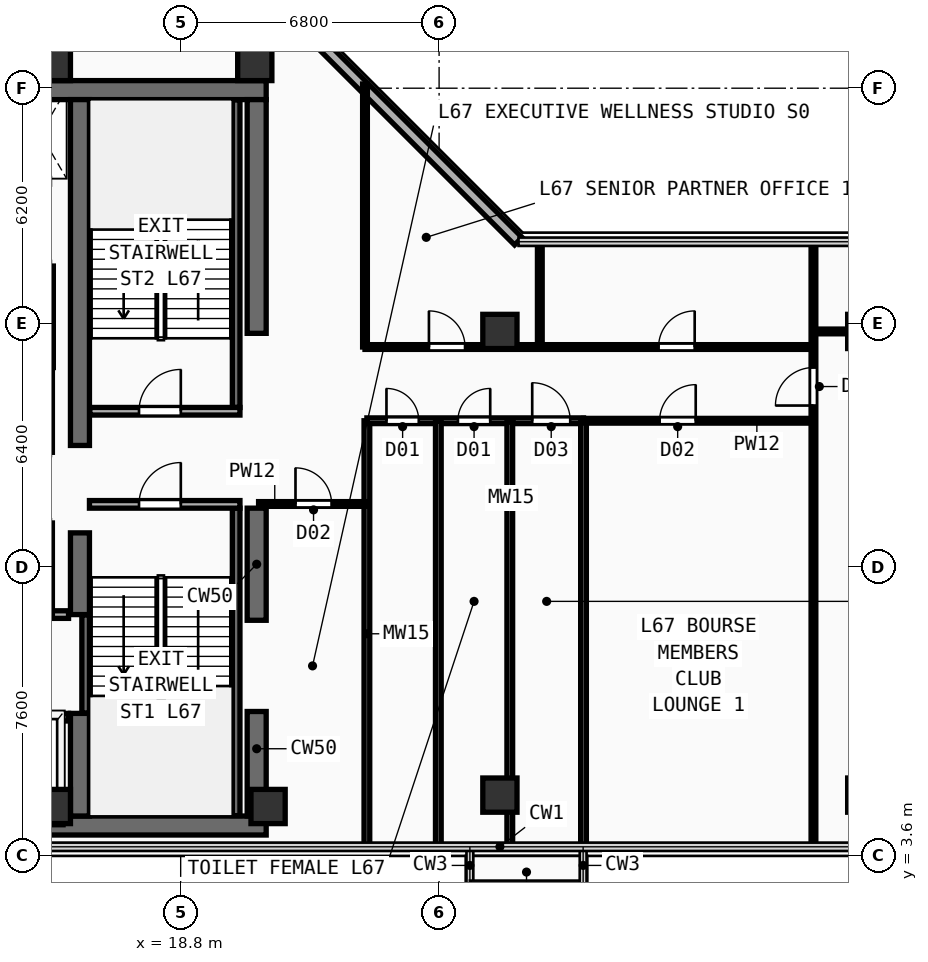
"""IFC4 building model, lengths in metres.
Left out: names, types, materials, properties, quantities, classifications, styles, units other than length and angle.
Written with IfcOpenShell. Run it as: python <this file> out.ifc"""

import sys

from ifc_helpers import new_model, si_unit, direction, frame, frame_2d, origin, origin_2d, place, context, subcontext, project, spatial, rectangle, extrude, element, fill, save


model = new_model("IFC4")
c1 = context("Model", 3, precision=1e-05, world=origin(), true_north=direction((0.0, 1.0)))
c2 = subcontext(c1, "Body", "Model", "MODEL_VIEW")
j1 = project(units=[si_unit("LENGTHUNIT", "METRE"), si_unit("PLANEANGLEUNIT", "RADIAN")], contexts=[c1])
p1 = place(None, origin())
s1 = spatial("IfcSite", under=j1, at=p1, CompositionType="ELEMENT")
p2 = place(p1, origin())
s2 = spatial("IfcBuilding", under=s1, at=p2, CompositionType="ELEMENT")
p3 = place(p2, frame((0.0, 0.0, 262.8)))
s3 = spatial("IfcBuildingStorey", under=s2, at=p3, CompositionType="ELEMENT", Elevation=262.8)
for number, where, z_axis, x_axis in (
    (1, (7.2, 4.4, 0.0), (0.0, 0.0, 1.0), (1.0, 0.0, 0.0)),
    (2, (7.2, 23.75, 0.0), (0.0, 0.0, 1.0), (1.0, 0.0, 0.0)),
):
    element("IfcWall", number, at=place(p3, frame(where, z_axis=z_axis, x_axis=x_axis)), inside=s3, PredefinedType="SHEAR", context=c2, shape_type="SweptSolid", body=[
        extrude(rectangle(XDim=13.85, YDim=0.5, at=frame_2d((6.925, 0.0))), origin(), (0.0, 0.0, 1.0), 3.56),
    ])
p4 = place(p3, frame((20.8, 4.65, 0.0), z_axis=(0.0, 0.0, 1.0), x_axis=(0.0, 1.0, 0.0)))
e3 = element("IfcWall", 3, at=p4, inside=s3, PredefinedType="SHEAR", context=c2, shape_type="SweptSolid", body=[
    extrude(rectangle(XDim=2.75, YDim=0.5, at=frame_2d((1.375, 0.0))), origin(), (0.0, 0.0, 1.0), 3.56),
])
p5 = place(p3, frame((20.8, 9.8, 0.0), z_axis=(0.0, 0.0, 1.0), x_axis=(0.0, 1.0, 0.0)))
e4 = element("IfcWall", 4, at=p5, inside=s3, PredefinedType="SHEAR", context=c2, shape_type="SweptSolid", body=[
    extrude(rectangle(XDim=2.95, YDim=0.5, at=frame_2d((1.475, 0.0))), origin(), (0.0, 0.0, 1.0), 3.56),
])
p6 = place(p3, frame((20.8, 17.35, 0.0), z_axis=(0.0, 0.0, 1.0), x_axis=(0.0, 1.0, 0.0)))
e5 = element("IfcWall", 5, at=p6, inside=s3, PredefinedType="SHEAR", context=c2, shape_type="SweptSolid", body=[
    extrude(rectangle(XDim=6.15, YDim=0.5, at=frame_2d((3.075, 0.0))), origin(), (0.0, 0.0, 1.0), 3.56),
])
p7 = place(p3, frame((16.15, 4.65, 0.0), z_axis=(0.0, 0.0, 1.0), x_axis=(0.0, 1.0, 0.0)))
e6 = element("IfcWall", 6, at=p7, inside=s3, PredefinedType="SHEAR", context=c2, shape_type="SweptSolid", body=[
    extrude(rectangle(XDim=2.7, YDim=0.5, at=frame_2d((1.35, 0.0))), origin(), (0.0, 0.0, 1.0), 3.56),
])
p8 = place(p3, frame((16.15, 9.95, 0.0), z_axis=(0.0, 0.0, 1.0), x_axis=(0.0, 1.0, 0.0)))
e7 = element("IfcWall", 7, at=p8, inside=s3, PredefinedType="SHEAR", context=c2, shape_type="SweptSolid", body=[
    extrude(rectangle(XDim=2.15, YDim=0.5, at=frame_2d((1.075, 0.0))), origin(), (0.0, 0.0, 1.0), 3.56),
])
p9 = place(p3, frame((16.15, 14.4, 0.0), z_axis=(0.0, 0.0, 1.0), x_axis=(0.0, 1.0, 0.0)))
e8 = element("IfcWall", 8, at=p9, inside=s3, PredefinedType="SHEAR", context=c2, shape_type="SweptSolid", body=[
    extrude(rectangle(XDim=9.1, YDim=0.5, at=frame_2d((4.55, 0.0))), origin(), (0.0, 0.0, 1.0), 3.56),
])
for number, where, z_axis, x_axis in (
    (9, (15.45, 4.9, 0.0), (0.0, 0.0, 1.0), (1.0, 0.0, 0.0)),
    (10, (21.1, 4.9, 0.0), (0.0, 0.0, 1.0), (1.0, 0.0, 0.0)),
    (11, (15.45, 24.45, 0.0), (0.0, 0.0, 1.0), (1.0, 0.0, 0.0)),
    (12, (20.75, 24.45, 0.0), (0.0, 0.0, 1.0), (1.0, 0.0, 0.0)),
    (13, (27.2, 5.2, 0.0), (0.0, 0.0, 1.0), (1.0, 0.0, 0.0)),
    (14, (36.8, 5.2, 0.0), (0.0, 0.0, 1.0), (1.0, 0.0, 0.0)),
    (15, (27.2, 17.4, 0.0), (0.0, 0.0, 1.0), (1.0, 0.0, 0.0)),
    (16, (36.8, 17.4, 0.0), (0.0, 0.0, 1.0), (1.0, 0.0, 0.0)),
):
    element("IfcColumn", number, at=place(p3, frame(where, z_axis=z_axis, x_axis=x_axis)), inside=s3, PredefinedType="COLUMN", context=c2, shape_type="SweptSolid", body=[
        extrude(rectangle(XDim=0.9, YDim=0.9, at=origin_2d()), origin(), (0.0, 0.0, 1.0), 3.56),
    ])
p10 = place(p3, frame((27.685, 19.775, 0.0), z_axis=(0.0, 0.0, 1.0), x_axis=(-0.707106781187, 0.707106781187, 0.0)))
e17 = element("IfcWall", 17, at=p10, inside=s3, PredefinedType="SOLIDWALL", context=c2, shape_type="SweptSolid", body=[
    extrude(rectangle(XDim=9.207, YDim=0.28, at=frame_2d((4.603, 0.0))), origin(), (0.0, 0.0, 1.0), 3.56),
])
p11 = place(p3, frame((16.3, 7.36, 0.0), z_axis=(0.0, 0.0, 1.0), x_axis=(0.0, 1.0, 0.0)))
e18 = element("IfcWall", 18, at=p11, inside=s3, PredefinedType="SHEAR", context=c2, shape_type="SweptSolid", body=[
    extrude(rectangle(XDim=2.58, YDim=0.2, at=frame_2d((1.29, 0.0))), origin(), (0.0, 0.0, 1.0), 3.56),
])
p12 = place(p3, frame((20.26, 4.66, 0.0), z_axis=(0.0, 0.0, 1.0), x_axis=(0.0, 1.0, 0.0)))
e19 = element("IfcWall", 19, at=p12, inside=s3, PredefinedType="SHEAR", context=c2, shape_type="SweptSolid", body=[
    extrude(rectangle(XDim=8.09, YDim=0.2, at=frame_2d((4.045, 0.0))), origin(), (0.0, 0.0, 1.0), 3.56),
])
p13 = place(p3, frame((16.4, 12.85, 0.0), z_axis=(0.0, 0.0, 1.0), x_axis=(1.0, 0.0, 0.0)))
e20 = element("IfcWall", 20, at=p13, inside=s3, PredefinedType="PARTITIONING", context=c2, shape_type="SweptSolid", body=[
    extrude(rectangle(XDim=3.96, YDim=0.2, at=frame_2d((1.98, 0.0))), origin(), (0.0, 0.0, 1.0), 3.56),
])
p14 = place(p13, frame((1.304, 0.0, 0.0)))
e21 = element("IfcOpeningElement", 21, at=p14, cuts=e20, PredefinedType="OPENING", context=c2, shape_type="SweptSolid", body=[
    extrude(rectangle(XDim=1.1, YDim=2.2, at=frame_2d((0.55, 1.1))), frame((0.0, 0.11, 0.0), z_axis=(0.0, -1.0, 0.0), x_axis=(1.0, 0.0, 0.0)), (0.0, 0.0, 1.0), 0.22),
])
p15 = place(p3, frame((20.26, 15.4, 0.0), z_axis=(0.0, 0.0, 1.0), x_axis=(0.0, 1.0, 0.0)))
e22 = element("IfcWall", 22, at=p15, inside=s3, PredefinedType="SHEAR", context=c2, shape_type="SweptSolid", body=[
    extrude(rectangle(XDim=8.09, YDim=0.2, at=frame_2d((4.045, 0.0))), origin(), (0.0, 0.0, 1.0), 3.56),
])
p16 = place(p3, frame((16.41, 15.3, 0.0), z_axis=(0.0, 0.0, 1.0), x_axis=(1.0, 0.0, 0.0)))
e23 = element("IfcWall", 23, at=p16, inside=s3, PredefinedType="PARTITIONING", context=c2, shape_type="SweptSolid", body=[
    extrude(rectangle(XDim=3.95, YDim=0.2, at=frame_2d((1.975, 0.0))), origin(), (0.0, 0.0, 1.0), 3.56),
])
p17 = place(p16, frame((1.294, 0.0, 0.0)))
e24 = element("IfcOpeningElement", 24, at=p17, cuts=e23, PredefinedType="OPENING", context=c2, shape_type="SweptSolid", body=[
    extrude(rectangle(XDim=1.1, YDim=2.2, at=frame_2d((0.55, 1.1))), frame((0.0, 0.11, 0.0), z_axis=(0.0, -1.0, 0.0), x_axis=(1.0, 0.0, 0.0)), (0.0, 0.0, 1.0), 0.22),
])
p18 = place(p3, frame((7.5, 7.25, 0.0), z_axis=(0.0, 0.0, 1.0), x_axis=(1.0, 0.0, 0.0)))
e25 = element("IfcWall", 25, at=p18, inside=s3, PredefinedType="PARTITIONING", context=c2, shape_type="SweptSolid", body=[
    extrude(rectangle(XDim=8.35, YDim=0.2, at=frame_2d((4.175, 0.0))), origin(), (0.0, 0.0, 1.0), 3.56),
])
p19 = place(p18, frame((0.53, 0.0, 0.0)))
e26 = element("IfcOpeningElement", 26, at=p19, cuts=e25, PredefinedType="OPENING", context=c2, shape_type="SweptSolid", body=[
    extrude(rectangle(XDim=1.1, YDim=2.2, at=frame_2d((0.55, 1.1))), frame((0.0, 0.11, 0.0), z_axis=(0.0, -1.0, 0.0), x_axis=(1.0, 0.0, 0.0)), (0.0, 0.0, 1.0), 0.22),
])
p20 = place(p18, frame((2.37, 0.0, 0.0)))
e27 = element("IfcOpeningElement", 27, at=p20, cuts=e25, PredefinedType="OPENING", context=c2, shape_type="SweptSolid", body=[
    extrude(rectangle(XDim=1.1, YDim=2.2, at=frame_2d((0.55, 1.1))), frame((0.0, 0.11, 0.0), z_axis=(0.0, -1.0, 0.0), x_axis=(1.0, 0.0, 0.0)), (0.0, 0.0, 1.0), 0.22),
])
p21 = place(p18, frame((4.33, 0.0, 0.0)))
e28 = element("IfcOpeningElement", 28, at=p21, cuts=e25, PredefinedType="OPENING", context=c2, shape_type="SweptSolid", body=[
    extrude(rectangle(XDim=1.1, YDim=2.2, at=frame_2d((0.55, 1.1))), frame((0.0, 0.11, 0.0), z_axis=(0.0, -1.0, 0.0), x_axis=(1.0, 0.0, 0.0)), (0.0, 0.0, 1.0), 0.22),
])
p22 = place(p18, frame((6.5, 0.0, 0.0)))
e29 = element("IfcOpeningElement", 29, at=p22, cuts=e25, PredefinedType="OPENING", context=c2, shape_type="SweptSolid", body=[
    extrude(rectangle(XDim=1.1, YDim=2.2, at=frame_2d((0.55, 1.1))), frame((0.0, 0.11, 0.0), z_axis=(0.0, -1.0, 0.0), x_axis=(1.0, 0.0, 0.0)), (0.0, 0.0, 1.0), 0.22),
])
p23 = place(p3, frame((7.5, 9.95, 0.0), z_axis=(0.0, 0.0, 1.0), x_axis=(1.0, 0.0, 0.0)))
e30 = element("IfcWall", 30, at=p23, inside=s3, PredefinedType="PARTITIONING", context=c2, shape_type="SweptSolid", body=[
    extrude(rectangle(XDim=8.35, YDim=0.2, at=frame_2d((4.175, 0.0))), origin(), (0.0, 0.0, 1.0), 3.56),
])
p24 = place(p3, frame((15.35, 9.95, 0.0), z_axis=(0.0, 0.0, 1.0), x_axis=(0.0, 1.0, 0.0)))
e31 = element("IfcWall", 31, at=p24, inside=s3, PredefinedType="PARTITIONING", context=c2, shape_type="SweptSolid", body=[
    extrude(rectangle(XDim=2.41, YDim=0.15, at=frame_2d((1.205, 0.0))), origin(), (0.0, 0.0, 1.0), 3.56),
])
p25 = place(p3, frame((15.35, 14.22, 0.0), z_axis=(0.0, 0.0, 1.0), x_axis=(0.0, 1.0, 0.0)))
e32 = element("IfcWall", 32, at=p25, inside=s3, PredefinedType="PARTITIONING", context=c2, shape_type="SweptSolid", body=[
    extrude(rectangle(XDim=2.23, YDim=0.15, at=frame_2d((1.115, 0.0))), origin(), (0.0, 0.0, 1.0), 3.56),
])
p26 = place(p3, frame((15.35, 16.45, 0.0), z_axis=(0.0, 0.0, 1.0), x_axis=(0.0, 1.0, 0.0)))
e33 = element("IfcWall", 33, at=p26, inside=s3, PredefinedType="PARTITIONING", context=c2, shape_type="SweptSolid", body=[
    extrude(rectangle(XDim=2.67, YDim=0.2, at=frame_2d((1.335, 0.0))), origin(), (0.0, 0.0, 1.0), 3.56),
])
p27 = place(p3, frame((23.7, 3.84, 0.0), z_axis=(0.0, 0.0, 1.0), x_axis=(0.0, 1.0, 0.0)))
e34 = element("IfcWall", 34, at=p27, inside=s3, PredefinedType="PLUMBINGWALL", context=c2, shape_type="SweptSolid", body=[
    extrude(rectangle(XDim=11.21, YDim=0.15, at=frame_2d((5.605, 0.0))), origin(), (0.0, 0.0, 1.0), 3.56),
])
p28 = place(p3, frame((23.7, 15.05, 0.0), z_axis=(0.0, 0.0, 1.0), x_axis=(1.0, 0.0, 0.0)))
e35 = element("IfcWall", 35, at=p28, inside=s3, PredefinedType="PLUMBINGWALL", context=c2, shape_type="SweptSolid", body=[
    extrude(rectangle(XDim=5.7, YDim=0.15, at=frame_2d((2.85, 0.0))), origin(), (0.0, 0.0, 1.0), 3.56),
])
p29 = place(p28, frame((0.515, 0.0, 0.0)))
e36 = element("IfcOpeningElement", 36, at=p29, cuts=e35, PredefinedType="OPENING", context=c2, shape_type="SweptSolid", body=[
    extrude(rectangle(XDim=0.85, YDim=2.15, at=frame_2d((0.425, 1.075))), frame((0.0, 0.085, 0.0), z_axis=(0.0, -1.0, 0.0), x_axis=(1.0, 0.0, 0.0)), (0.0, 0.0, 1.0), 0.17),
])
p30 = place(p28, frame((2.395, 0.0, 0.0)))
e37 = element("IfcOpeningElement", 37, at=p30, cuts=e35, PredefinedType="OPENING", context=c2, shape_type="SweptSolid", body=[
    extrude(rectangle(XDim=0.85, YDim=2.15, at=frame_2d((0.425, 1.075))), frame((0.0, 0.085, 0.0), z_axis=(0.0, -1.0, 0.0), x_axis=(1.0, 0.0, 0.0)), (0.0, 0.0, 1.0), 0.17),
])
p31 = place(p28, frame((4.35, 0.0, 0.0)))
e38 = element("IfcOpeningElement", 38, at=p31, cuts=e35, PredefinedType="OPENING", context=c2, shape_type="SweptSolid", body=[
    extrude(rectangle(XDim=1.0, YDim=2.2, at=frame_2d((0.5, 1.1))), frame((0.0, 0.085, 0.0), z_axis=(0.0, -1.0, 0.0), x_axis=(1.0, 0.0, 0.0)), (0.0, 0.0, 1.0), 0.17),
])
p32 = place(p3, frame((25.58, 3.84, 0.0), z_axis=(0.0, 0.0, 1.0), x_axis=(0.0, 1.0, 0.0)))
e39 = element("IfcWall", 39, at=p32, inside=s3, PredefinedType="PLUMBINGWALL", context=c2, shape_type="SweptSolid", body=[
    extrude(rectangle(XDim=11.21, YDim=0.15, at=frame_2d((5.605, 0.0))), origin(), (0.0, 0.0, 1.0), 3.56),
])
p33 = place(p3, frame((27.46, 3.84, 0.0), z_axis=(0.0, 0.0, 1.0), x_axis=(0.0, 1.0, 0.0)))
e40 = element("IfcWall", 40, at=p33, inside=s3, PredefinedType="PLUMBINGWALL", context=c2, shape_type="SweptSolid", body=[
    extrude(rectangle(XDim=11.21, YDim=0.15, at=frame_2d((5.605, 0.0))), origin(), (0.0, 0.0, 1.0), 2.798),
])
p34 = place(p3, frame((29.4, 3.84, 0.0), z_axis=(0.0, 0.0, 1.0), x_axis=(0.0, 1.0, 0.0)))
e41 = element("IfcWall", 41, at=p34, inside=s3, PredefinedType="PLUMBINGWALL", context=c2, shape_type="SweptSolid", body=[
    extrude(rectangle(XDim=11.21, YDim=0.15, at=frame_2d((5.605, 0.0))), origin(), (0.0, 0.0, 1.0), 3.56),
])
p35 = place(p3, frame((20.85, 12.86, 0.0), z_axis=(0.0, 0.0, 1.0), x_axis=(1.0, 0.0, 0.0)))
e42 = element("IfcWall", 42, at=p35, inside=s3, PredefinedType="PARTITIONING", context=c2, shape_type="SweptSolid", body=[
    extrude(rectangle(XDim=2.85, YDim=0.125, at=frame_2d((1.425, 0.0))), origin(), (0.0, 0.0, 1.0), 3.56),
])
p36 = place(p35, frame((0.971, 0.0, 0.0)))
e43 = element("IfcOpeningElement", 43, at=p36, cuts=e42, PredefinedType="OPENING", context=c2, shape_type="SweptSolid", body=[
    extrude(rectangle(XDim=0.95, YDim=2.15, at=frame_2d((0.475, 1.075))), frame((0.0, 0.073, 0.0), z_axis=(0.0, -1.0, 0.0), x_axis=(1.0, 0.0, 0.0)), (0.0, 0.0, 1.0), 0.145),
])
p37 = place(p3, frame((29.4, 15.05, 0.0), z_axis=(0.0, 0.0, 1.0), x_axis=(1.0, 0.0, 0.0)))
e44 = element("IfcWall", 44, at=p37, inside=s3, PredefinedType="PARTITIONING", context=c2, shape_type="SweptSolid", body=[
    extrude(rectangle(XDim=6.05, YDim=0.125, at=frame_2d((3.025, 0.0))), origin(), (0.0, 0.0, 1.0), 3.56),
])
p38 = place(p37, frame((2.002, 0.0, 0.0)))
e45 = element("IfcOpeningElement", 45, at=p38, cuts=e44, PredefinedType="OPENING", context=c2, shape_type="SweptSolid", body=[
    extrude(rectangle(XDim=0.95, YDim=2.15, at=frame_2d((0.475, 1.075))), frame((0.0, 0.073, 0.0), z_axis=(0.0, -1.0, 0.0), x_axis=(1.0, 0.0, 0.0)), (0.0, 0.0, 1.0), 0.145),
])
p39 = place(p3, frame((35.45, 3.84, 0.0), z_axis=(0.0, 0.0, 1.0), x_axis=(0.0, 1.0, 0.0)))
e46 = element("IfcWall", 46, at=p39, inside=s3, PredefinedType="PARTITIONING", context=c2, shape_type="SweptSolid", body=[
    extrude(rectangle(XDim=15.92, YDim=0.125, at=frame_2d((7.96, 0.0))), origin(), (0.0, 0.0, 1.0), 3.56),
])
p40 = place(p39, frame((11.61, 0.0, 0.0)))
e47 = element("IfcOpeningElement", 47, at=p40, cuts=e46, PredefinedType="OPENING", context=c2, shape_type="SweptSolid", body=[
    extrude(rectangle(XDim=1.0, YDim=2.2, at=frame_2d((0.5, 1.1))), frame((0.0, 0.073, 0.0), z_axis=(0.0, -1.0, 0.0), x_axis=(1.0, 0.0, 0.0)), (0.0, 0.0, 1.0), 0.145),
])
p41 = place(p3, frame((35.45, 17.4, 0.0), z_axis=(0.0, 0.0, 1.0), x_axis=(1.0, 0.0, 0.0)))
e48 = element("IfcWall", 48, at=p41, inside=s3, PredefinedType="PARTITIONING", context=c2, shape_type="SweptSolid", body=[
    extrude(rectangle(XDim=15.71, YDim=0.125, at=frame_2d((7.855, 0.0))), origin(), (0.0, 0.0, 1.0), 3.2),
])
p42 = place(p41, frame((2.95, 0.0, 0.0)))
e49 = element("IfcOpeningElement", 49, at=p42, cuts=e48, PredefinedType="OPENING", context=c2, shape_type="SweptSolid", body=[
    extrude(rectangle(XDim=0.95, YDim=2.15, at=frame_2d((0.475, 1.075))), frame((0.0, 0.073, 0.0), z_axis=(0.0, -1.0, 0.0), x_axis=(1.0, 0.0, 0.0)), (0.0, 0.0, 1.0), 0.145),
])
p43 = place(p3, frame((23.65, 16.99, 0.0), z_axis=(0.0, 0.0, 1.0), x_axis=(0.0, 1.0, 0.0)))
e50 = element("IfcWall", 50, at=p43, inside=s3, PredefinedType="PARTITIONING", context=c2, shape_type="SweptSolid", body=[
    extrude(rectangle(XDim=6.92, YDim=0.125, at=frame_2d((3.46, 0.0))), origin(), (0.0, 0.0, 1.0), 3.56),
])
p44 = place(p3, frame((23.65, 16.99, 0.0), z_axis=(0.0, 0.0, 1.0), x_axis=(1.0, 0.0, 0.0)))
e51 = element("IfcWall", 51, at=p44, inside=s3, PredefinedType="PARTITIONING", context=c2, shape_type="SweptSolid", body=[
    extrude(rectangle(XDim=11.8, YDim=0.125, at=frame_2d((5.9, 0.0))), origin(), (0.0, 0.0, 1.0), 3.56),
])
p45 = place(p44, frame((1.683, 0.0, 0.0)))
e52 = element("IfcOpeningElement", 52, at=p45, cuts=e51, PredefinedType="OPENING", context=c2, shape_type="SweptSolid", body=[
    extrude(rectangle(XDim=0.95, YDim=2.15, at=frame_2d((0.475, 1.075))), frame((0.0, 0.073, 0.0), z_axis=(0.0, -1.0, 0.0), x_axis=(1.0, 0.0, 0.0)), (0.0, 0.0, 1.0), 0.145),
])
p46 = place(p44, frame((7.725, 0.0, 0.0)))
e53 = element("IfcOpeningElement", 53, at=p46, cuts=e51, PredefinedType="OPENING", context=c2, shape_type="SweptSolid", body=[
    extrude(rectangle(XDim=0.95, YDim=2.15, at=frame_2d((0.475, 1.075))), frame((0.0, 0.073, 0.0), z_axis=(0.0, -1.0, 0.0), x_axis=(1.0, 0.0, 0.0)), (0.0, 0.0, 1.0), 0.145),
])
p47 = place(p3, frame((28.25, 16.99, 0.0), z_axis=(0.0, 0.0, 1.0), x_axis=(0.0, 1.0, 0.0)))
e54 = element("IfcWall", 54, at=p47, inside=s3, PredefinedType="PARTITIONING", context=c2, shape_type="SweptSolid", body=[
    extrude(rectangle(XDim=2.77, YDim=0.125, at=frame_2d((1.385, 0.0))), origin(), (0.0, 0.0, 1.0), 3.56),
])
p48 = place(p14, frame((1.1, 0.0, 0.0), z_axis=(0.0, 0.0, 1.0), x_axis=(-1.0, 0.0, 0.0)))
e55 = element("IfcDoor", 55, at=p48, inside=s3, OperationType="SINGLE_SWING_LEFT", PredefinedType="DOOR", context=c2, shape_type="SweptSolid", body=[
    extrude(rectangle(XDim=1.1, YDim=2.2, at=frame_2d((0.55, 1.1))), frame((0.0, 0.025, 0.0), z_axis=(0.0, -1.0, 0.0), x_axis=(1.0, 0.0, 0.0)), (0.0, 0.0, 1.0), 0.05),
])
fill(e21, e55)
p49 = place(p17, origin())
e56 = element("IfcDoor", 56, at=p49, inside=s3, OperationType="SINGLE_SWING_RIGHT", PredefinedType="DOOR", context=c2, shape_type="SweptSolid", body=[
    extrude(rectangle(XDim=1.1, YDim=2.2, at=frame_2d((0.55, 1.1))), frame((0.0, 0.025, 0.0), z_axis=(0.0, -1.0, 0.0), x_axis=(1.0, 0.0, 0.0)), (0.0, 0.0, 1.0), 0.05),
])
fill(e24, e56)
p50 = place(p29, origin())
e57 = element("IfcDoor", 57, at=p50, inside=s3, OperationType="SINGLE_SWING_LEFT", PredefinedType="DOOR", context=c2, shape_type="SweptSolid", body=[
    extrude(rectangle(XDim=0.85, YDim=2.15, at=frame_2d((0.425, 1.075))), frame((0.0, 0.025, 0.0), z_axis=(0.0, -1.0, 0.0), x_axis=(1.0, 0.0, 0.0)), (0.0, 0.0, 1.0), 0.05),
])
fill(e36, e57)
p51 = place(p30, origin())
e58 = element("IfcDoor", 58, at=p51, inside=s3, OperationType="SINGLE_SWING_RIGHT", PredefinedType="DOOR", context=c2, shape_type="SweptSolid", body=[
    extrude(rectangle(XDim=0.85, YDim=2.15, at=frame_2d((0.425, 1.075))), frame((0.0, 0.025, 0.0), z_axis=(0.0, -1.0, 0.0), x_axis=(1.0, 0.0, 0.0)), (0.0, 0.0, 1.0), 0.05),
])
fill(e37, e58)
p52 = place(p31, origin())
e59 = element("IfcDoor", 59, at=p52, inside=s3, OperationType="SINGLE_SWING_LEFT", PredefinedType="DOOR", context=c2, shape_type="SweptSolid", body=[
    extrude(rectangle(XDim=1.0, YDim=2.2, at=frame_2d((0.5, 1.1))), frame((0.0, 0.025, 0.0), z_axis=(0.0, -1.0, 0.0), x_axis=(1.0, 0.0, 0.0)), (0.0, 0.0, 1.0), 0.05),
])
fill(e38, e59)
p53 = place(p36, origin())
e60 = element("IfcDoor", 60, at=p53, inside=s3, OperationType="SINGLE_SWING_LEFT", PredefinedType="DOOR", context=c2, shape_type="SweptSolid", body=[
    extrude(rectangle(XDim=0.95, YDim=2.15, at=frame_2d((0.475, 1.075))), frame((0.0, 0.025, 0.0), z_axis=(0.0, -1.0, 0.0), x_axis=(1.0, 0.0, 0.0)), (0.0, 0.0, 1.0), 0.05),
])
fill(e43, e60)
p54 = place(p38, origin())
e61 = element("IfcDoor", 61, at=p54, inside=s3, OperationType="SINGLE_SWING_RIGHT", PredefinedType="DOOR", context=c2, shape_type="SweptSolid", body=[
    extrude(rectangle(XDim=0.95, YDim=2.15, at=frame_2d((0.475, 1.075))), frame((0.0, 0.025, 0.0), z_axis=(0.0, -1.0, 0.0), x_axis=(1.0, 0.0, 0.0)), (0.0, 0.0, 1.0), 0.05),
])
fill(e45, e61)
p55 = place(p40, origin())
e62 = element("IfcDoor", 62, at=p55, inside=s3, OperationType="SINGLE_SWING_LEFT", PredefinedType="DOOR", context=c2, shape_type="SweptSolid", body=[
    extrude(rectangle(XDim=1.0, YDim=2.2, at=frame_2d((0.5, 1.1))), frame((0.0, 0.025, 0.0), z_axis=(0.0, -1.0, 0.0), x_axis=(1.0, 0.0, 0.0)), (0.0, 0.0, 1.0), 0.05),
])
fill(e47, e62)
p56 = place(p45, origin())
e63 = element("IfcDoor", 63, at=p56, inside=s3, OperationType="SINGLE_SWING_LEFT", PredefinedType="DOOR", context=c2, shape_type="SweptSolid", body=[
    extrude(rectangle(XDim=0.95, YDim=2.15, at=frame_2d((0.475, 1.075))), frame((0.0, 0.025, 0.0), z_axis=(0.0, -1.0, 0.0), x_axis=(1.0, 0.0, 0.0)), (0.0, 0.0, 1.0), 0.05),
])
fill(e52, e63)
p57 = place(p46, origin())
e64 = element("IfcDoor", 64, at=p57, inside=s3, OperationType="SINGLE_SWING_RIGHT", PredefinedType="DOOR", context=c2, shape_type="SweptSolid", body=[
    extrude(rectangle(XDim=0.95, YDim=2.15, at=frame_2d((0.475, 1.075))), frame((0.0, 0.025, 0.0), z_axis=(0.0, -1.0, 0.0), x_axis=(1.0, 0.0, 0.0)), (0.0, 0.0, 1.0), 0.05),
])
fill(e53, e64)
save(model, sys.argv[1])
